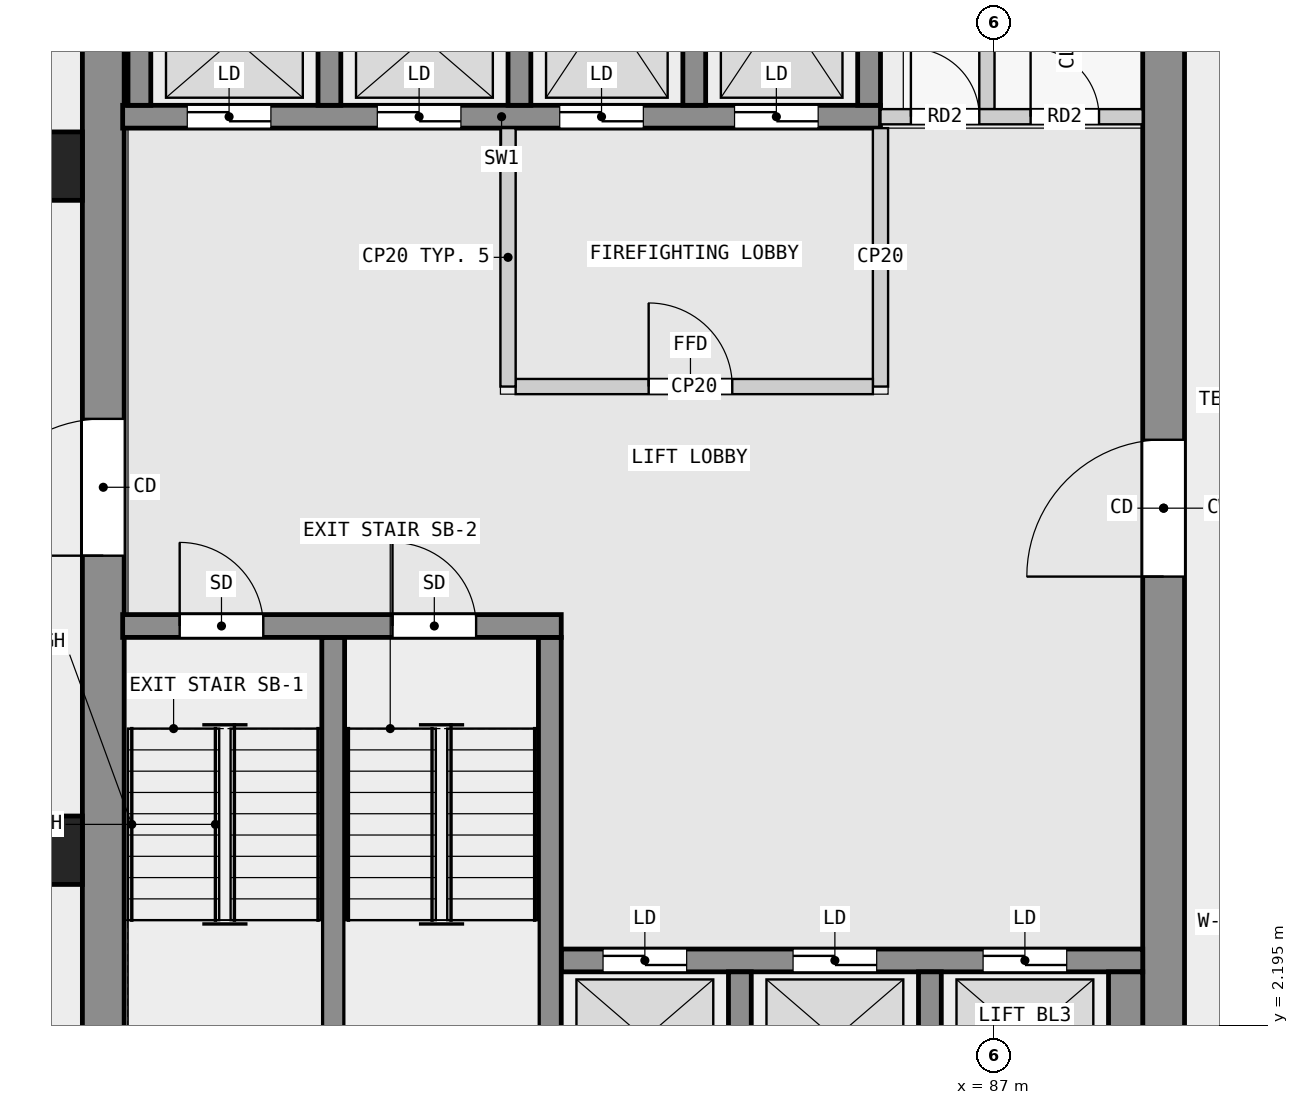
"""IFC4 building model, lengths in metres.
Left out: names, types, materials, properties, quantities, classifications, styles, units other than length and angle.
Written with IfcOpenShell. Run it as: python <this file> out.ifc"""

import sys

from ifc_helpers import new_model, si_unit, direction, frame, frame_2d, origin, origin_2d, place, context, subcontext, project, spatial, rectangle, extrude, element, fill, save


model = new_model("IFC4")
c1 = context("Model", 3, precision=1e-05, world=origin(), true_north=direction((0.0, 1.0)))
c2 = subcontext(c1, "Body", "Model", "MODEL_VIEW")
j1 = project(units=[si_unit("LENGTHUNIT", "METRE"), si_unit("PLANEANGLEUNIT", "RADIAN")], contexts=[c1])
p1 = place(None, origin())
s1 = spatial("IfcSite", under=j1, at=p1, CompositionType="ELEMENT")
p2 = place(p1, origin())
s2 = spatial("IfcBuilding", under=s1, at=p2, CompositionType="ELEMENT")
p3 = place(p2, frame((0.0, 0.0, 37.3)))
s3 = spatial("IfcBuildingStorey", under=s2, at=p3, CompositionType="ELEMENT", Elevation=37.3)
for number, where, z_axis, x_axis in (
    (1, (74.55, 13.5, 0.0), (0.0, 0.0, 1.0), (1.0, 0.0, 0.0)),
    (2, (74.55, 4.5, 0.0), (0.0, 0.0, 1.0), (1.0, 0.0, 0.0)),
):
    element("IfcColumn", number, at=place(p3, frame(where, z_axis=z_axis, x_axis=x_axis)), inside=s3, PredefinedType="COLUMN", context=c2, shape_type="SweptSolid", body=[
        extrude(rectangle(XDim=0.9, YDim=0.9, at=origin_2d()), origin(), (0.0, 0.0, 1.0), 3.5),
    ])
p4 = place(p3, frame((75.275, 0.55, 0.0), z_axis=(0.0, 0.0, 1.0), x_axis=(0.0, 1.0, 0.0)))
e3 = element("IfcWall", 3, at=p4, inside=s3, PredefinedType="SHEAR", context=c2, shape_type="SweptSolid", body=[
    extrude(rectangle(XDim=16.9, YDim=0.55, at=frame_2d((8.45, 0.0))), origin(), (0.0, 0.0, 1.0), 3.25),
])
p5 = place(p4, frame((7.825, 0.0, 0.0)))
e4 = element("IfcOpeningElement", 4, at=p5, cuts=e3, PredefinedType="OPENING", context=c2, shape_type="SweptSolid", body=[
    extrude(rectangle(XDim=1.8, YDim=2.1, at=frame_2d((0.9, 1.05))), frame((0.0, 0.285, 0.0), z_axis=(0.0, -1.0, 0.0), x_axis=(1.0, 0.0, 0.0)), (0.0, 0.0, 1.0), 0.57),
])
p6 = place(p3, frame((89.225, 0.55, 0.0), z_axis=(0.0, 0.0, 1.0), x_axis=(0.0, 1.0, 0.0)))
e5 = element("IfcWall", 5, at=p6, inside=s3, PredefinedType="SHEAR", context=c2, shape_type="SweptSolid", body=[
    extrude(rectangle(XDim=16.9, YDim=0.55, at=frame_2d((8.45, 0.0))), origin(), (0.0, 0.0, 1.0), 3.25),
])
p7 = place(p6, frame((7.55, 0.0, 0.0)))
e6 = element("IfcOpeningElement", 6, at=p7, cuts=e5, PredefinedType="OPENING", context=c2, shape_type="SweptSolid", body=[
    extrude(rectangle(XDim=1.8, YDim=2.1, at=frame_2d((0.9, 1.05))), frame((0.0, 0.285, 0.0), z_axis=(0.0, -1.0, 0.0), x_axis=(1.0, 0.0, 0.0)), (0.0, 0.0, 1.0), 0.57),
])
p8 = place(p3, frame((75.53, 7.45, 0.0), z_axis=(0.0, 0.0, 1.0), x_axis=(1.0, 0.0, 0.0)))
e7 = element("IfcWall", 7, at=p8, inside=s3, PredefinedType="SHEAR", context=c2, shape_type="SweptSolid", body=[
    extrude(rectangle(XDim=5.77, YDim=0.3, at=frame_2d((2.885, 0.0))), origin(), (0.0, 0.0, 1.0), 3.25),
])
p9 = place(p8, frame((0.75, 0.0, 0.0)))
e8 = element("IfcOpeningElement", 8, at=p9, cuts=e7, PredefinedType="OPENING", context=c2, shape_type="SweptSolid", body=[
    extrude(rectangle(XDim=1.1, YDim=2.1, at=frame_2d((0.55, 1.05))), frame((0.0, 0.16, 0.0), z_axis=(0.0, -1.0, 0.0), x_axis=(1.0, 0.0, 0.0)), (0.0, 0.0, 1.0), 0.32),
])
p10 = place(p8, frame((3.55, 0.0, 0.0)))
e9 = element("IfcOpeningElement", 9, at=p10, cuts=e7, PredefinedType="OPENING", context=c2, shape_type="SweptSolid", body=[
    extrude(rectangle(XDim=1.1, YDim=2.1, at=frame_2d((0.55, 1.05))), frame((0.0, 0.16, 0.0), z_axis=(0.0, -1.0, 0.0), x_axis=(1.0, 0.0, 0.0)), (0.0, 0.0, 1.0), 0.32),
])
for number, where, z_axis, x_axis in (
    (10, (78.3, 0.9, 0.0), (0.0, 0.0, 1.0), (0.0, 1.0, 0.0)),
    (11, (81.15, 0.9, 0.0), (0.0, 0.0, 1.0), (0.0, 1.0, 0.0)),
):
    element("IfcWall", number, at=place(p3, frame(where, z_axis=z_axis, x_axis=x_axis)), inside=s3, PredefinedType="SHEAR", context=c2, shape_type="SweptSolid", body=[
        extrude(rectangle(XDim=6.4, YDim=0.3, at=frame_2d((3.2, 0.0))), origin(), (0.0, 0.0, 1.0), 3.25),
    ])
for number, where, z_axis, x_axis in (
    (12, (83.65, 0.9, 0.0), (0.0, 0.0, 1.0), (0.0, 1.0, 0.0)),
    (13, (86.15, 0.9, 0.0), (0.0, 0.0, 1.0), (0.0, 1.0, 0.0)),
):
    element("IfcWall", number, at=place(p3, frame(where, z_axis=z_axis, x_axis=x_axis)), inside=s3, PredefinedType="SHEAR", context=c2, shape_type="SweptSolid", body=[
        extrude(rectangle(XDim=2.0, YDim=0.3, at=frame_2d((1.0, 0.0))), origin(), (0.0, 0.0, 1.0), 3.25),
    ])
p11 = place(p3, frame((88.725, 0.9, 0.0), z_axis=(0.0, 0.0, 1.0), x_axis=(0.0, 1.0, 0.0)))
e14 = element("IfcWall", 14, at=p11, inside=s3, PredefinedType="SHEAR", context=c2, shape_type="SweptSolid", body=[
    extrude(rectangle(XDim=2.0, YDim=0.45, at=frame_2d((1.0, 0.0))), origin(), (0.0, 0.0, 1.0), 3.25),
])
p12 = place(p3, frame((81.3, 3.05, 0.0), z_axis=(0.0, 0.0, 1.0), x_axis=(1.0, 0.0, 0.0)))
e15 = element("IfcWall", 15, at=p12, inside=s3, PredefinedType="SHEAR", context=c2, shape_type="SweptSolid", body=[
    extrude(rectangle(XDim=7.65, YDim=0.3, at=frame_2d((3.825, 0.0))), origin(), (0.0, 0.0, 1.0), 3.25),
])
p13 = place(p12, frame((0.55, 0.0, 0.0)))
e16 = element("IfcOpeningElement", 16, at=p13, cuts=e15, PredefinedType="OPENING", context=c2, shape_type="SweptSolid", body=[
    extrude(rectangle(XDim=1.1, YDim=2.1, at=frame_2d((0.55, 1.05))), frame((0.0, 0.16, 0.0), z_axis=(0.0, -1.0, 0.0), x_axis=(1.0, 0.0, 0.0)), (0.0, 0.0, 1.0), 0.32),
])
p14 = place(p12, frame((3.05, 0.0, 0.0)))
e17 = element("IfcOpeningElement", 17, at=p14, cuts=e15, PredefinedType="OPENING", context=c2, shape_type="SweptSolid", body=[
    extrude(rectangle(XDim=1.1, YDim=2.1, at=frame_2d((0.55, 1.05))), frame((0.0, 0.16, 0.0), z_axis=(0.0, -1.0, 0.0), x_axis=(1.0, 0.0, 0.0)), (0.0, 0.0, 1.0), 0.32),
])
p15 = place(p12, frame((5.55, 0.0, 0.0)))
e18 = element("IfcOpeningElement", 18, at=p15, cuts=e15, PredefinedType="OPENING", context=c2, shape_type="SweptSolid", body=[
    extrude(rectangle(XDim=1.1, YDim=2.1, at=frame_2d((0.55, 1.05))), frame((0.0, 0.16, 0.0), z_axis=(0.0, -1.0, 0.0), x_axis=(1.0, 0.0, 0.0)), (0.0, 0.0, 1.0), 0.32),
])
p16 = place(p3, frame((75.53, 14.15, 0.0), z_axis=(0.0, 0.0, 1.0), x_axis=(1.0, 0.0, 0.0)))
e19 = element("IfcWall", 19, at=p16, inside=s3, PredefinedType="SHEAR", context=c2, shape_type="SweptSolid", body=[
    extrude(rectangle(XDim=9.97, YDim=0.3, at=frame_2d((4.985, 0.0))), origin(), (0.0, 0.0, 1.0), 3.25),
])
p17 = place(p16, frame((0.85, 0.0, 0.0)))
e20 = element("IfcOpeningElement", 20, at=p17, cuts=e19, PredefinedType="OPENING", context=c2, shape_type="SweptSolid", body=[
    extrude(rectangle(XDim=1.1, YDim=2.1, at=frame_2d((0.55, 1.05))), frame((0.0, 0.16, 0.0), z_axis=(0.0, -1.0, 0.0), x_axis=(1.0, 0.0, 0.0)), (0.0, 0.0, 1.0), 0.32),
])
p18 = place(p16, frame((3.35, 0.0, 0.0)))
e21 = element("IfcOpeningElement", 21, at=p18, cuts=e19, PredefinedType="OPENING", context=c2, shape_type="SweptSolid", body=[
    extrude(rectangle(XDim=1.1, YDim=2.1, at=frame_2d((0.55, 1.05))), frame((0.0, 0.16, 0.0), z_axis=(0.0, -1.0, 0.0), x_axis=(1.0, 0.0, 0.0)), (0.0, 0.0, 1.0), 0.32),
])
p19 = place(p16, frame((5.75, 0.0, 0.0)))
e22 = element("IfcOpeningElement", 22, at=p19, cuts=e19, PredefinedType="OPENING", context=c2, shape_type="SweptSolid", body=[
    extrude(rectangle(XDim=1.1, YDim=2.1, at=frame_2d((0.55, 1.05))), frame((0.0, 0.16, 0.0), z_axis=(0.0, -1.0, 0.0), x_axis=(1.0, 0.0, 0.0)), (0.0, 0.0, 1.0), 0.32),
])
p20 = place(p16, frame((8.05, 0.0, 0.0)))
e23 = element("IfcOpeningElement", 23, at=p20, cuts=e19, PredefinedType="OPENING", context=c2, shape_type="SweptSolid", body=[
    extrude(rectangle(XDim=1.1, YDim=2.1, at=frame_2d((0.55, 1.05))), frame((0.0, 0.16, 0.0), z_axis=(0.0, -1.0, 0.0), x_axis=(1.0, 0.0, 0.0)), (0.0, 0.0, 1.0), 0.32),
])
for number, where, z_axis, x_axis in (
    (24, (75.75, 14.3, 0.0), (0.0, 0.0, 1.0), (0.0, 1.0, 0.0)),
    (25, (78.25, 14.3, 0.0), (0.0, 0.0, 1.0), (0.0, 1.0, 0.0)),
    (26, (80.75, 14.3, 0.0), (0.0, 0.0, 1.0), (0.0, 1.0, 0.0)),
    (27, (83.05, 14.3, 0.0), (0.0, 0.0, 1.0), (0.0, 1.0, 0.0)),
    (28, (85.35, 14.3, 0.0), (0.0, 0.0, 1.0), (0.0, 1.0, 0.0)),
):
    element("IfcWall", number, at=place(p3, frame(where, z_axis=z_axis, x_axis=x_axis)), inside=s3, PredefinedType="SHEAR", context=c2, shape_type="SweptSolid", body=[
        extrude(rectangle(XDim=2.8, YDim=0.3, at=frame_2d((1.4, 0.0))), origin(), (0.0, 0.0, 1.0), 3.25),
    ])
p21 = place(p3, frame((80.6, 10.6, 0.0), z_axis=(0.0, 0.0, 1.0), x_axis=(0.0, 1.0, 0.0)))
e29 = element("IfcWall", 29, at=p21, inside=s3, PredefinedType="PARTITIONING", context=c2, shape_type="SweptSolid", body=[
    extrude(rectangle(XDim=3.4, YDim=0.2, at=frame_2d((1.7, 0.0))), origin(), (0.0, 0.0, 1.0), 3.25),
])
p22 = place(p3, frame((80.7, 10.6, 0.0), z_axis=(0.0, 0.0, 1.0), x_axis=(1.0, 0.0, 0.0)))
e30 = element("IfcWall", 30, at=p22, inside=s3, PredefinedType="PARTITIONING", context=c2, shape_type="SweptSolid", body=[
    extrude(rectangle(XDim=4.7, YDim=0.2, at=frame_2d((2.35, 0.0))), origin(), (0.0, 0.0, 1.0), 3.25),
])
p23 = place(p22, frame((1.75, 0.0, 0.0)))
e31 = element("IfcOpeningElement", 31, at=p23, cuts=e30, PredefinedType="OPENING", context=c2, shape_type="SweptSolid", body=[
    extrude(rectangle(XDim=1.1, YDim=2.1, at=frame_2d((0.55, 1.05))), frame((0.0, 0.11, 0.0), z_axis=(0.0, -1.0, 0.0), x_axis=(1.0, 0.0, 0.0)), (0.0, 0.0, 1.0), 0.22),
])
p24 = place(p3, frame((85.5, 10.6, 0.0), z_axis=(0.0, 0.0, 1.0), x_axis=(0.0, 1.0, 0.0)))
e32 = element("IfcWall", 32, at=p24, inside=s3, PredefinedType="PARTITIONING", context=c2, shape_type="SweptSolid", body=[
    extrude(rectangle(XDim=3.4, YDim=0.2, at=frame_2d((1.7, 0.0))), origin(), (0.0, 0.0, 1.0), 3.25),
])
p25 = place(p3, frame((85.5, 14.15, 0.0), z_axis=(0.0, 0.0, 1.0), x_axis=(1.0, 0.0, 0.0)))
e33 = element("IfcWall", 33, at=p25, inside=s3, PredefinedType="PARTITIONING", context=c2, shape_type="SweptSolid", body=[
    extrude(rectangle(XDim=3.45, YDim=0.2, at=frame_2d((1.725, 0.0))), origin(), (0.0, 0.0, 1.0), 3.25),
])
p26 = place(p25, frame((0.4, 0.0, 0.0)))
e34 = element("IfcOpeningElement", 34, at=p26, cuts=e33, PredefinedType="OPENING", context=c2, shape_type="SweptSolid", body=[
    extrude(rectangle(XDim=0.9, YDim=2.1, at=frame_2d((0.45, 1.05))), frame((0.0, 0.11, 0.0), z_axis=(0.0, -1.0, 0.0), x_axis=(1.0, 0.0, 0.0)), (0.0, 0.0, 1.0), 0.22),
])
p27 = place(p25, frame((1.975, 0.0, 0.0)))
e35 = element("IfcOpeningElement", 35, at=p27, cuts=e33, PredefinedType="OPENING", context=c2, shape_type="SweptSolid", body=[
    extrude(rectangle(XDim=0.9, YDim=2.1, at=frame_2d((0.45, 1.05))), frame((0.0, 0.11, 0.0), z_axis=(0.0, -1.0, 0.0), x_axis=(1.0, 0.0, 0.0)), (0.0, 0.0, 1.0), 0.22),
])
p28 = place(p3, frame((86.9, 14.25, 0.0), z_axis=(0.0, 0.0, 1.0), x_axis=(0.0, 1.0, 0.0)))
e36 = element("IfcWall", 36, at=p28, inside=s3, PredefinedType="PARTITIONING", context=c2, shape_type="SweptSolid", body=[
    extrude(rectangle(XDim=3.2, YDim=0.2, at=frame_2d((1.6, 0.0))), origin(), (0.0, 0.0, 1.0), 3.25),
])
p29 = place(p23, origin())
e37 = element("IfcDoor", 37, at=p29, inside=s3, OperationType="SINGLE_SWING_LEFT", PredefinedType="DOOR", context=c2, shape_type="SweptSolid", body=[
    extrude(rectangle(XDim=1.1, YDim=2.1, at=frame_2d((0.55, 1.05))), frame((0.0, 0.025, 0.0), z_axis=(0.0, -1.0, 0.0), x_axis=(1.0, 0.0, 0.0)), (0.0, 0.0, 1.0), 0.05),
])
fill(e31, e37)
p30 = place(p13, origin())
e38 = element("IfcDoor", 38, at=p30, inside=s3, OperationType="DOUBLE_DOOR_SLIDING", PredefinedType="DOOR", context=c2, shape_type="SweptSolid", body=[
    extrude(rectangle(XDim=1.1, YDim=2.1, at=frame_2d((0.55, 1.05))), frame((0.0, 0.025, 0.0), z_axis=(0.0, -1.0, 0.0), x_axis=(1.0, 0.0, 0.0)), (0.0, 0.0, 1.0), 0.05),
])
fill(e16, e38)
p31 = place(p14, origin())
e39 = element("IfcDoor", 39, at=p31, inside=s3, OperationType="DOUBLE_DOOR_SLIDING", PredefinedType="DOOR", context=c2, shape_type="SweptSolid", body=[
    extrude(rectangle(XDim=1.1, YDim=2.1, at=frame_2d((0.55, 1.05))), frame((0.0, 0.025, 0.0), z_axis=(0.0, -1.0, 0.0), x_axis=(1.0, 0.0, 0.0)), (0.0, 0.0, 1.0), 0.05),
])
fill(e17, e39)
p32 = place(p15, origin())
e40 = element("IfcDoor", 40, at=p32, inside=s3, OperationType="DOUBLE_DOOR_SLIDING", PredefinedType="DOOR", context=c2, shape_type="SweptSolid", body=[
    extrude(rectangle(XDim=1.1, YDim=2.1, at=frame_2d((0.55, 1.05))), frame((0.0, 0.025, 0.0), z_axis=(0.0, -1.0, 0.0), x_axis=(1.0, 0.0, 0.0)), (0.0, 0.0, 1.0), 0.05),
])
fill(e18, e40)
p33 = place(p17, origin())
e41 = element("IfcDoor", 41, at=p33, inside=s3, OperationType="DOUBLE_DOOR_SLIDING", PredefinedType="DOOR", context=c2, shape_type="SweptSolid", body=[
    extrude(rectangle(XDim=1.1, YDim=2.1, at=frame_2d((0.55, 1.05))), frame((0.0, 0.025, 0.0), z_axis=(0.0, -1.0, 0.0), x_axis=(1.0, 0.0, 0.0)), (0.0, 0.0, 1.0), 0.05),
])
fill(e20, e41)
p34 = place(p18, origin())
e42 = element("IfcDoor", 42, at=p34, inside=s3, OperationType="DOUBLE_DOOR_SLIDING", PredefinedType="DOOR", context=c2, shape_type="SweptSolid", body=[
    extrude(rectangle(XDim=1.1, YDim=2.1, at=frame_2d((0.55, 1.05))), frame((0.0, 0.025, 0.0), z_axis=(0.0, -1.0, 0.0), x_axis=(1.0, 0.0, 0.0)), (0.0, 0.0, 1.0), 0.05),
])
fill(e21, e42)
p35 = place(p19, origin())
e43 = element("IfcDoor", 43, at=p35, inside=s3, OperationType="DOUBLE_DOOR_SLIDING", PredefinedType="DOOR", context=c2, shape_type="SweptSolid", body=[
    extrude(rectangle(XDim=1.1, YDim=2.1, at=frame_2d((0.55, 1.05))), frame((0.0, 0.025, 0.0), z_axis=(0.0, -1.0, 0.0), x_axis=(1.0, 0.0, 0.0)), (0.0, 0.0, 1.0), 0.05),
])
fill(e22, e43)
p36 = place(p20, origin())
e44 = element("IfcDoor", 44, at=p36, inside=s3, OperationType="DOUBLE_DOOR_SLIDING", PredefinedType="DOOR", context=c2, shape_type="SweptSolid", body=[
    extrude(rectangle(XDim=1.1, YDim=2.1, at=frame_2d((0.55, 1.05))), frame((0.0, 0.025, 0.0), z_axis=(0.0, -1.0, 0.0), x_axis=(1.0, 0.0, 0.0)), (0.0, 0.0, 1.0), 0.05),
])
fill(e23, e44)
p37 = place(p9, origin())
e45 = element("IfcDoor", 45, at=p37, inside=s3, OperationType="SINGLE_SWING_RIGHT", PredefinedType="DOOR", context=c2, shape_type="SweptSolid", body=[
    extrude(rectangle(XDim=1.1, YDim=2.1, at=frame_2d((0.55, 1.05))), frame((0.0, 0.025, 0.0), z_axis=(0.0, -1.0, 0.0), x_axis=(1.0, 0.0, 0.0)), (0.0, 0.0, 1.0), 0.05),
])
fill(e8, e45)
p38 = place(p10, origin())
e46 = element("IfcDoor", 46, at=p38, inside=s3, OperationType="SINGLE_SWING_LEFT", PredefinedType="DOOR", context=c2, shape_type="SweptSolid", body=[
    extrude(rectangle(XDim=1.1, YDim=2.1, at=frame_2d((0.55, 1.05))), frame((0.0, 0.025, 0.0), z_axis=(0.0, -1.0, 0.0), x_axis=(1.0, 0.0, 0.0)), (0.0, 0.0, 1.0), 0.05),
])
fill(e9, e46)
p39 = place(p5, origin())
e47 = element("IfcDoor", 47, at=p39, inside=s3, OperationType="DOUBLE_DOOR_SINGLE_SWING", PredefinedType="DOOR", context=c2, shape_type="SweptSolid", body=[
    extrude(rectangle(XDim=1.8, YDim=2.1, at=frame_2d((0.9, 1.05))), frame((0.0, 0.025, 0.0), z_axis=(0.0, -1.0, 0.0), x_axis=(1.0, 0.0, 0.0)), (0.0, 0.0, 1.0), 0.05),
])
fill(e4, e47)
p40 = place(p7, origin())
e48 = element("IfcDoor", 48, at=p40, inside=s3, OperationType="DOUBLE_DOOR_SINGLE_SWING", PredefinedType="DOOR", context=c2, shape_type="SweptSolid", body=[
    extrude(rectangle(XDim=1.8, YDim=2.1, at=frame_2d((0.9, 1.05))), frame((0.0, 0.025, 0.0), z_axis=(0.0, -1.0, 0.0), x_axis=(1.0, 0.0, 0.0)), (0.0, 0.0, 1.0), 0.05),
])
fill(e6, e48)
p41 = place(p26, origin())
e49 = element("IfcDoor", 49, at=p41, inside=s3, OperationType="SINGLE_SWING_LEFT", PredefinedType="DOOR", context=c2, shape_type="SweptSolid", body=[
    extrude(rectangle(XDim=0.9, YDim=2.1, at=frame_2d((0.45, 1.05))), frame((0.0, 0.025, 0.0), z_axis=(0.0, -1.0, 0.0), x_axis=(1.0, 0.0, 0.0)), (0.0, 0.0, 1.0), 0.05),
])
fill(e34, e49)
p42 = place(p27, origin())
e50 = element("IfcDoor", 50, at=p42, inside=s3, OperationType="SINGLE_SWING_LEFT", PredefinedType="DOOR", context=c2, shape_type="SweptSolid", body=[
    extrude(rectangle(XDim=0.9, YDim=2.1, at=frame_2d((0.45, 1.05))), frame((0.0, 0.025, 0.0), z_axis=(0.0, -1.0, 0.0), x_axis=(1.0, 0.0, 0.0)), (0.0, 0.0, 1.0), 0.05),
])
fill(e35, e50)
save(model, sys.argv[1])
